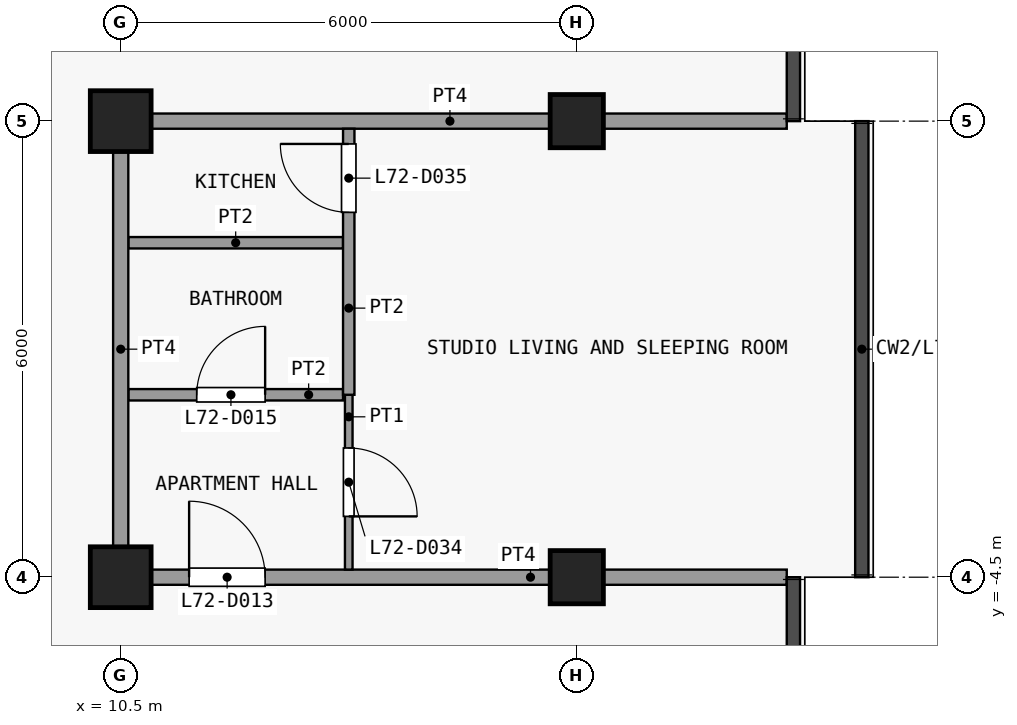
"""IFC4 building model, lengths in metres.
Left out: names, types, materials, properties, quantities, classifications, styles, units other than length and angle.
Written with IfcOpenShell. Run it as: python <this file> out.ifc"""

import sys

from ifc_helpers import new_model, si_unit, direction, frame, frame_2d, origin, origin_2d, place, context, subcontext, project, spatial, rectangle, extrude, element, fill, save


model = new_model("IFC4")
c1 = context("Model", 3, precision=1e-05, world=origin(), true_north=direction((0.0, 1.0)))
c2 = subcontext(c1, "Body", "Model", "MODEL_VIEW")
j1 = project(units=[si_unit("LENGTHUNIT", "METRE"), si_unit("PLANEANGLEUNIT", "RADIAN")], contexts=[c1])
p1 = place(None, origin())
s1 = spatial("IfcSite", under=j1, at=p1, CompositionType="ELEMENT")
p2 = place(p1, origin())
s2 = spatial("IfcBuilding", under=s1, at=p2, CompositionType="ELEMENT")
p3 = place(p2, frame((0.0, 0.0, 284.3)))
s3 = spatial("IfcBuildingStorey", under=s2, at=p3, CompositionType="ELEMENT", Elevation=284.3)
for number, where, z_axis, x_axis in (
    (1, (10.5, -4.5, 0.0), (0.0, 0.0, 1.0), (1.0, 0.0, 0.0)),
    (2, (10.5, 1.5, 0.0), (0.0, 0.0, 1.0), (1.0, 0.0, 0.0)),
):
    element("IfcColumn", number, at=place(p3, frame(where, z_axis=z_axis, x_axis=x_axis)), inside=s3, PredefinedType="COLUMN", context=c2, shape_type="SweptSolid", body=[
        extrude(rectangle(XDim=0.8, YDim=0.8, at=origin_2d()), origin(), (0.0, 0.0, 1.0), 3.6),
    ])
for number, where, z_axis, x_axis in (
    (3, (16.5, -4.5, 0.0), (0.0, 0.0, 1.0), (1.0, 0.0, 0.0)),
    (4, (16.5, 1.5, 0.0), (0.0, 0.0, 1.0), (1.0, 0.0, 0.0)),
):
    element("IfcColumn", number, at=place(p3, frame(where, z_axis=z_axis, x_axis=x_axis)), inside=s3, PredefinedType="COLUMN", context=c2, shape_type="SweptSolid", body=[
        extrude(rectangle(XDim=0.7, YDim=0.7, at=origin_2d()), origin(), (0.0, 0.0, 1.0), 3.6),
    ])
p4 = place(p3, frame((10.4, -4.5, 0.0), z_axis=(0.0, 0.0, 1.0), x_axis=(1.0, 0.0, 0.0)))
e5 = element("IfcWall", 5, at=p4, inside=s3, PredefinedType="PARTITIONING", context=c2, shape_type="SweptSolid", body=[
    extrude(rectangle(XDim=8.863, YDim=0.2, at=frame_2d((4.431, 0.0))), origin(), (0.0, 0.0, 1.0), 3.3),
])
p5 = place(p4, frame((1.0, 0.0, 0.0)))
e6 = element("IfcOpeningElement", 6, at=p5, cuts=e5, PredefinedType="OPENING", context=c2, shape_type="SweptSolid", body=[
    extrude(rectangle(XDim=1.0, YDim=2.1, at=frame_2d((0.5, 1.05))), frame((0.0, 0.11, 0.0), z_axis=(0.0, -1.0, 0.0), x_axis=(1.0, 0.0, 0.0)), (0.0, 0.0, 1.0), 0.22),
])
p6 = place(p3, frame((10.6, -2.1, 0.0), z_axis=(0.0, 0.0, 1.0), x_axis=(1.0, 0.0, 0.0)))
e7 = element("IfcWall", 7, at=p6, inside=s3, PredefinedType="PARTITIONING", context=c2, shape_type="SweptSolid", body=[
    extrude(rectangle(XDim=2.825, YDim=0.15, at=frame_2d((1.413, 0.0))), origin(), (0.0, 0.0, 1.0), 3.3),
])
p7 = place(p6, frame((0.9, 0.0, 0.0)))
e8 = element("IfcOpeningElement", 8, at=p7, cuts=e7, PredefinedType="OPENING", context=c2, shape_type="SweptSolid", body=[
    extrude(rectangle(XDim=0.9, YDim=2.1, at=frame_2d((0.45, 1.05))), frame((0.0, 0.085, 0.0), z_axis=(0.0, -1.0, 0.0), x_axis=(1.0, 0.0, 0.0)), (0.0, 0.0, 1.0), 0.17),
])
p8 = place(p3, frame((10.6, -0.1, 0.0), z_axis=(0.0, 0.0, 1.0), x_axis=(1.0, 0.0, 0.0)))
e9 = element("IfcWall", 9, at=p8, inside=s3, PredefinedType="PARTITIONING", context=c2, shape_type="SweptSolid", body=[
    extrude(rectangle(XDim=2.825, YDim=0.15, at=frame_2d((1.413, 0.0))), origin(), (0.0, 0.0, 1.0), 3.3),
])
p9 = place(p3, frame((10.4, 1.5, 0.0), z_axis=(0.0, 0.0, 1.0), x_axis=(1.0, 0.0, 0.0)))
e10 = element("IfcWall", 10, at=p9, inside=s3, PredefinedType="PARTITIONING", context=c2, shape_type="SweptSolid", body=[
    extrude(rectangle(XDim=8.863, YDim=0.2, at=frame_2d((4.431, 0.0))), origin(), (0.0, 0.0, 1.0), 3.3),
])
p10 = place(p3, frame((10.5, -4.4, 0.0), z_axis=(0.0, 0.0, 1.0), x_axis=(0.0, 1.0, 0.0)))
e11 = element("IfcWall", 11, at=p10, inside=s3, PredefinedType="PARTITIONING", context=c2, shape_type="SweptSolid", body=[
    extrude(rectangle(XDim=5.8, YDim=0.2, at=frame_2d((2.9, 0.0))), origin(), (0.0, 0.0, 1.0), 3.3),
])
p11 = place(p3, frame((13.5, -4.4, 0.0), z_axis=(0.0, 0.0, 1.0), x_axis=(0.0, 1.0, 0.0)))
e12 = element("IfcWall", 12, at=p11, inside=s3, PredefinedType="PARTITIONING", context=c2, shape_type="SweptSolid", body=[
    extrude(rectangle(XDim=2.3, YDim=0.1, at=frame_2d((1.15, 0.0))), origin(), (0.0, 0.0, 1.0), 3.3),
])
p12 = place(p11, frame((0.7, 0.0, 0.0)))
e13 = element("IfcOpeningElement", 13, at=p12, cuts=e12, PredefinedType="OPENING", context=c2, shape_type="SweptSolid", body=[
    extrude(rectangle(XDim=0.9, YDim=2.1, at=frame_2d((0.45, 1.05))), frame((0.0, 0.06, 0.0), z_axis=(0.0, -1.0, 0.0), x_axis=(1.0, 0.0, 0.0)), (0.0, 0.0, 1.0), 0.12),
])
p13 = place(p3, frame((13.5, -2.1, 0.0), z_axis=(0.0, 0.0, 1.0), x_axis=(0.0, 1.0, 0.0)))
e14 = element("IfcWall", 14, at=p13, inside=s3, PredefinedType="PARTITIONING", context=c2, shape_type="SweptSolid", body=[
    extrude(rectangle(XDim=3.5, YDim=0.15, at=frame_2d((1.75, 0.0))), origin(), (0.0, 0.0, 1.0), 3.3),
])
p14 = place(p13, frame((2.4, 0.0, 0.0)))
e15 = element("IfcOpeningElement", 15, at=p14, cuts=e14, PredefinedType="OPENING", context=c2, shape_type="SweptSolid", body=[
    extrude(rectangle(XDim=0.9, YDim=2.1, at=frame_2d((0.45, 1.05))), frame((0.0, 0.085, 0.0), z_axis=(0.0, -1.0, 0.0), x_axis=(1.0, 0.0, 0.0)), (0.0, 0.0, 1.0), 0.17),
])
p15 = place(p5, origin())
e16 = element("IfcDoor", 16, at=p15, inside=s3, OperationType="SINGLE_SWING_RIGHT", PredefinedType="DOOR", context=c2, shape_type="SweptSolid", body=[
    extrude(rectangle(XDim=1.0, YDim=2.1, at=frame_2d((0.5, 1.05))), frame((0.0, 0.025, 0.0), z_axis=(0.0, -1.0, 0.0), x_axis=(1.0, 0.0, 0.0)), (0.0, 0.0, 1.0), 0.05),
])
fill(e6, e16)
p16 = place(p7, origin())
e17 = element("IfcDoor", 17, at=p16, inside=s3, OperationType="SINGLE_SWING_LEFT", PredefinedType="DOOR", context=c2, shape_type="SweptSolid", body=[
    extrude(rectangle(XDim=0.9, YDim=2.1, at=frame_2d((0.45, 1.05))), frame((0.0, 0.025, 0.0), z_axis=(0.0, -1.0, 0.0), x_axis=(1.0, 0.0, 0.0)), (0.0, 0.0, 1.0), 0.05),
])
fill(e8, e17)
p17 = place(p12, origin())
e18 = element("IfcDoor", 18, at=p17, inside=s3, OperationType="SINGLE_SWING_LEFT", PredefinedType="DOOR", context=c2, shape_type="SweptSolid", body=[
    extrude(rectangle(XDim=0.9, YDim=2.1, at=frame_2d((0.45, 1.05))), frame((0.0, 0.025, 0.0), z_axis=(0.0, -1.0, 0.0), x_axis=(1.0, 0.0, 0.0)), (0.0, 0.0, 1.0), 0.05),
])
fill(e13, e18)
p18 = place(p14, origin())
e19 = element("IfcDoor", 19, at=p18, inside=s3, OperationType="SINGLE_SWING_LEFT", PredefinedType="DOOR", context=c2, shape_type="SweptSolid", body=[
    extrude(rectangle(XDim=0.9, YDim=2.1, at=frame_2d((0.45, 1.05))), frame((0.0, 0.025, 0.0), z_axis=(0.0, -1.0, 0.0), x_axis=(1.0, 0.0, 0.0)), (0.0, 0.0, 1.0), 0.05),
])
fill(e15, e19)
save(model, sys.argv[1])
